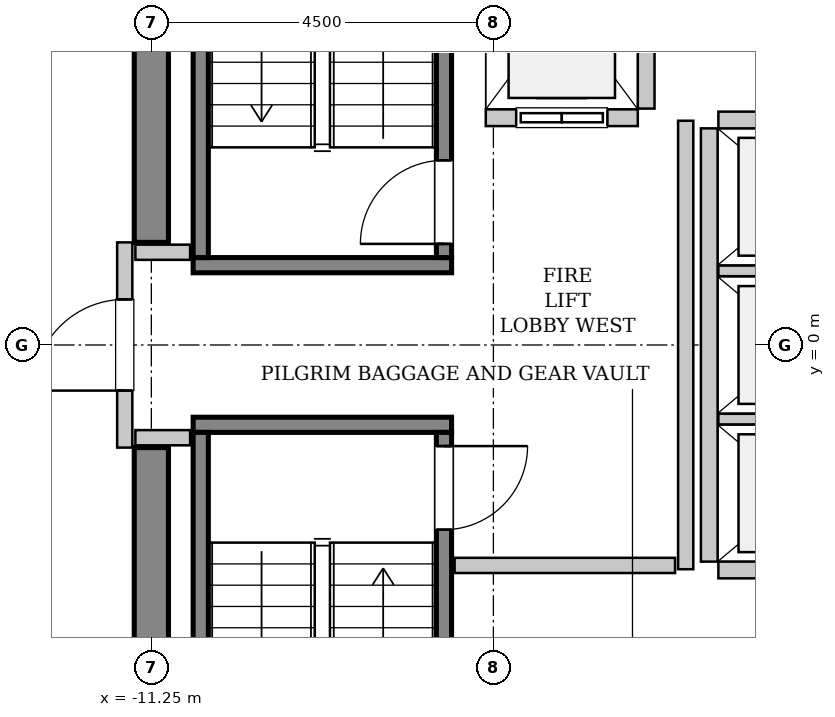
"""IFC4 building model, lengths in metres.
Left out: names, types, materials, properties, quantities, classifications, styles, units other than length and angle.
Written with IfcOpenShell. Run it as: python <this file> out.ifc"""

import sys

from ifc_helpers import new_model, si_unit, direction, frame, frame_2d, origin, place, context, subcontext, project, spatial, rectangle, extrude, source, transform, mapped, element, fill, save


model = new_model("IFC4")
c1 = context("Model", 3, precision=1e-05, world=origin(), true_north=direction((0.0, 1.0)))
c2 = subcontext(c1, "Body", "Model", "MODEL_VIEW")
j1 = project(units=[si_unit("LENGTHUNIT", "METRE"), si_unit("PLANEANGLEUNIT", "RADIAN")], contexts=[c1])
p1 = place(None, origin())
s1 = spatial("IfcSite", under=j1, at=p1, CompositionType="ELEMENT")
p2 = place(p1, origin())
s2 = spatial("IfcBuilding", under=s1, at=p2, CompositionType="ELEMENT")
p3 = place(p2, frame((0.0, 0.0, 291.2)))
s3 = spatial("IfcBuildingStorey", under=s2, at=p3, CompositionType="ELEMENT", Elevation=291.2)
m1 = source(origin(), c2, "Body", "SweptSolid", [
    extrude(rectangle(XDim=7.425, YDim=0.45, at=frame_2d((3.712, 0.0))), origin(), (0.0, 0.0, 1.0), 3.8),
])
for number, where, z_axis, x_axis in (
    (1, (-11.25, -8.775, 0.0), (0.0, 0.0, 1.0), (0.0, 1.0, 0.0)),
    (2, (-11.25, 1.35, 0.0), (0.0, 0.0, 1.0), (0.0, 1.0, 0.0)),
):
    element("IfcWall", number, at=place(p3, frame(where, z_axis=z_axis, x_axis=x_axis)), inside=s3, PredefinedType="SHEAR", context=c2, shape_type="MappedRepresentation", body=[
        mapped(m1, transform((0.0, 0.0, 0.0), x_axis=(1.0, 0.0, 0.0), y_axis=(0.0, 1.0, 0.0), z_axis=(0.0, 0.0, 1.0), scale=1.0)),
    ])
m2 = source(origin(), c2, "Body", "SweptSolid", [
    extrude(rectangle(XDim=3.4, YDim=0.2, at=frame_2d((1.7, 0.0))), origin(), (0.0, 0.0, 1.0), 3.8),
])
p4 = place(p3, frame((-7.3, 1.05, 0.0), z_axis=(0.0, 0.0, 1.0), x_axis=(-1.0, 0.0, 0.0)))
e3 = element("IfcWall", 3, at=p4, inside=s3, PredefinedType="SOLIDWALL", context=c2, shape_type="MappedRepresentation", body=[
    mapped(m2, transform((0.0, 0.0, 0.0), x_axis=(1.0, 0.0, 0.0), y_axis=(0.0, 1.0, 0.0), z_axis=(0.0, 0.0, 1.0), scale=1.0)),
])
m3 = source(origin(), c2, "Body", "SweptSolid", [
    extrude(rectangle(XDim=7.1, YDim=0.2, at=frame_2d((3.55, 0.0))), origin(), (0.0, 0.0, 1.0), 3.8),
])
p5 = place(p3, frame((-7.4, 1.15, 0.0), z_axis=(0.0, 0.0, 1.0), x_axis=(0.0, 1.0, 0.0)))
e4 = element("IfcWall", 4, at=p5, inside=s3, PredefinedType="SOLIDWALL", context=c2, shape_type="MappedRepresentation", body=[
    mapped(m3, transform((0.0, 0.0, 0.0), x_axis=(1.0, 0.0, 0.0), y_axis=(0.0, 1.0, 0.0), z_axis=(0.0, 0.0, 1.0), scale=1.0)),
])
p6 = place(p5, frame((0.18, 0.0, 0.0)))
e5 = element("IfcOpeningElement", 5, at=p6, cuts=e4, PredefinedType="OPENING", context=c2, shape_type="SweptSolid", body=[
    extrude(rectangle(XDim=1.1, YDim=2.15, at=frame_2d((0.55, 1.075))), frame((0.0, 0.11, 0.0), z_axis=(0.0, -1.0, 0.0), x_axis=(1.0, 0.0, 0.0)), (0.0, 0.0, 1.0), 0.22),
])
p7 = place(p3, frame((-10.6, 1.15, 0.0), z_axis=(0.0, 0.0, 1.0), x_axis=(0.0, 1.0, 0.0)))
e6 = element("IfcWall", 6, at=p7, inside=s3, PredefinedType="SOLIDWALL", context=c2, shape_type="MappedRepresentation", body=[
    mapped(m3, transform((0.0, 0.0, 0.0), x_axis=(1.0, 0.0, 0.0), y_axis=(0.0, 1.0, 0.0), z_axis=(0.0, 0.0, 1.0), scale=1.0)),
])
p8 = place(p3, frame((-10.7, -1.05, 0.0), z_axis=(0.0, 0.0, 1.0), x_axis=(1.0, 0.0, 0.0)))
e7 = element("IfcWall", 7, at=p8, inside=s3, PredefinedType="SOLIDWALL", context=c2, shape_type="MappedRepresentation", body=[
    mapped(m2, transform((0.0, 0.0, 0.0), x_axis=(1.0, 0.0, 0.0), y_axis=(0.0, 1.0, 0.0), z_axis=(0.0, 0.0, 1.0), scale=1.0)),
])
p9 = place(p3, frame((-10.6, -1.15, 0.0), z_axis=(0.0, 0.0, 1.0), x_axis=(0.0, -1.0, 0.0)))
e8 = element("IfcWall", 8, at=p9, inside=s3, PredefinedType="SOLIDWALL", context=c2, shape_type="MappedRepresentation", body=[
    mapped(m3, transform((0.0, 0.0, 0.0), x_axis=(1.0, 0.0, 0.0), y_axis=(0.0, 1.0, 0.0), z_axis=(0.0, 0.0, 1.0), scale=1.0)),
])
p10 = place(p3, frame((-7.4, -1.15, 0.0), z_axis=(0.0, 0.0, 1.0), x_axis=(0.0, -1.0, 0.0)))
e9 = element("IfcWall", 9, at=p10, inside=s3, PredefinedType="SOLIDWALL", context=c2, shape_type="MappedRepresentation", body=[
    mapped(m3, transform((0.0, 0.0, 0.0), x_axis=(1.0, 0.0, 0.0), y_axis=(0.0, 1.0, 0.0), z_axis=(0.0, 0.0, 1.0), scale=1.0)),
])
p11 = place(p10, frame((0.18, 0.0, 0.0)))
e10 = element("IfcOpeningElement", 10, at=p11, cuts=e9, PredefinedType="OPENING", context=c2, shape_type="SweptSolid", body=[
    extrude(rectangle(XDim=1.1, YDim=2.15, at=frame_2d((0.55, 1.075))), frame((0.0, 0.11, 0.0), z_axis=(0.0, -1.0, 0.0), x_axis=(1.0, 0.0, 0.0)), (0.0, 0.0, 1.0), 0.22),
])
m4 = source(origin(), c2, "Body", "SweptSolid", [
    extrude(rectangle(XDim=2.0, YDim=0.22, at=frame_2d((1.0, 0.0))), origin(), (0.0, 0.0, 1.0), 3.535),
])
p12 = place(p3, frame((-6.85, 2.99, 0.0), z_axis=(0.0, 0.0, 1.0), x_axis=(1.0, 0.0, 0.0)))
e11 = element("IfcWall", 11, at=p12, inside=s3, PredefinedType="SOLIDWALL", context=c2, shape_type="MappedRepresentation", body=[
    mapped(m4, transform((0.0, 0.0, 0.0), x_axis=(1.0, 0.0, 0.0), y_axis=(0.0, 1.0, 0.0), z_axis=(0.0, 0.0, 1.0), scale=1.0)),
])
p13 = place(p12, frame((0.4, 0.0, 0.0)))
e12 = element("IfcOpeningElement", 12, at=p13, cuts=e11, PredefinedType="OPENING", context=c2, shape_type="SweptSolid", body=[
    extrude(rectangle(XDim=1.2, YDim=2.2, at=frame_2d((0.6, 1.1))), frame((0.0, 0.12, 0.0), z_axis=(0.0, -1.0, 0.0), x_axis=(1.0, 0.0, 0.0)), (0.0, 0.0, 1.0), 0.24),
])
m5 = source(origin(), c2, "Body", "SweptSolid", [
    extrude(rectangle(XDim=2.68, YDim=0.22, at=frame_2d((1.34, 0.0))), origin(), (0.0, 0.0, 1.0), 3.535),
])
p14 = place(p3, frame((-4.74, 3.11, 0.0), z_axis=(0.0, 0.0, 1.0), x_axis=(0.0, 1.0, 0.0)))
e13 = element("IfcWall", 13, at=p14, inside=s3, PredefinedType="SOLIDWALL", context=c2, shape_type="MappedRepresentation", body=[
    mapped(m5, transform((0.0, 0.0, 0.0), x_axis=(1.0, 0.0, 0.0), y_axis=(0.0, 1.0, 0.0), z_axis=(0.0, 0.0, 1.0), scale=1.0)),
])
m6 = source(origin(), c2, "Body", "SweptSolid", [
    extrude(rectangle(XDim=5.7, YDim=0.22, at=frame_2d((2.85, 0.0))), origin(), (0.0, 0.0, 1.0), 3.535),
])
p15 = place(p3, frame((-3.91, 2.85, 0.0), z_axis=(0.0, 0.0, 1.0), x_axis=(0.0, -1.0, 0.0)))
e14 = element("IfcWall", 14, at=p15, inside=s3, PredefinedType="SOLIDWALL", context=c2, shape_type="MappedRepresentation", body=[
    mapped(m6, transform((0.0, 0.0, 0.0), x_axis=(1.0, 0.0, 0.0), y_axis=(0.0, 1.0, 0.0), z_axis=(0.0, 0.0, 1.0), scale=1.0)),
])
m7 = source(origin(), c2, "Body", "SweptSolid", [
    extrude(rectangle(XDim=2.13, YDim=0.22, at=frame_2d((1.065, 0.0))), origin(), (0.0, 0.0, 1.0), 3.535),
])
p16 = place(p3, frame((-3.79, -2.96, 0.0), z_axis=(0.0, 0.0, 1.0), x_axis=(1.0, 0.0, 0.0)))
e15 = element("IfcWall", 15, at=p16, inside=s3, PredefinedType="SOLIDWALL", context=c2, shape_type="MappedRepresentation", body=[
    mapped(m7, transform((0.0, 0.0, 0.0), x_axis=(1.0, 0.0, 0.0), y_axis=(0.0, 1.0, 0.0), z_axis=(0.0, 0.0, 1.0), scale=1.0)),
])
m8 = source(origin(), c2, "Body", "SweptSolid", [
    extrude(rectangle(XDim=2.13, YDim=0.14, at=frame_2d((1.065, 0.0))), origin(), (0.0, 0.0, 1.0), 3.535),
])
for number, where, z_axis, x_axis in (
    (16, (-3.79, -0.975, 0.0), (0.0, 0.0, 1.0), (1.0, 0.0, 0.0)),
    (17, (-3.79, 0.975, 0.0), (0.0, 0.0, 1.0), (1.0, 0.0, 0.0)),
):
    element("IfcWall", number, at=place(p3, frame(where, z_axis=z_axis, x_axis=x_axis)), inside=s3, PredefinedType="PARTITIONING", context=c2, shape_type="MappedRepresentation", body=[
        mapped(m8, transform((0.0, 0.0, 0.0), x_axis=(1.0, 0.0, 0.0), y_axis=(0.0, 1.0, 0.0), z_axis=(0.0, 0.0, 1.0), scale=1.0)),
    ])
p17 = place(p3, frame((-1.66, 2.96, 0.0), z_axis=(0.0, 0.0, 1.0), x_axis=(-1.0, 0.0, 0.0)))
e18 = element("IfcWall", 18, at=p17, inside=s3, PredefinedType="SOLIDWALL", context=c2, shape_type="MappedRepresentation", body=[
    mapped(m7, transform((0.0, 0.0, 0.0), x_axis=(1.0, 0.0, 0.0), y_axis=(0.0, 1.0, 0.0), z_axis=(0.0, 0.0, 1.0), scale=1.0)),
])
m9 = source(origin(), c2, "Body", "SweptSolid", [
    extrude(rectangle(XDim=2.7, YDim=0.2, at=frame_2d((1.35, 0.0))), origin(), (0.0, 0.0, 1.0), 2.625),
])
p18 = place(p3, frame((-11.6, -1.35, 0.0), z_axis=(0.0, 0.0, 1.0), x_axis=(0.0, 1.0, 0.0)))
e19 = element("IfcWall", 19, at=p18, inside=s3, PredefinedType="PARTITIONING", context=c2, shape_type="MappedRepresentation", body=[
    mapped(m9, transform((0.0, 0.0, 0.0), x_axis=(1.0, 0.0, 0.0), y_axis=(0.0, 1.0, 0.0), z_axis=(0.0, 0.0, 1.0), scale=1.0)),
])
p19 = place(p18, frame((0.75, 0.0, 0.0)))
e20 = element("IfcOpeningElement", 20, at=p19, cuts=e19, PredefinedType="OPENING", context=c2, shape_type="SweptSolid", body=[
    extrude(rectangle(XDim=1.2, YDim=2.15, at=frame_2d((0.6, 1.075))), frame((0.0, 0.11, 0.0), z_axis=(0.0, -1.0, 0.0), x_axis=(1.0, 0.0, 0.0)), (0.0, 0.0, 1.0), 0.22),
])
m10 = source(origin(), c2, "Body", "SweptSolid", [
    extrude(rectangle(XDim=5.9, YDim=0.2, at=frame_2d((2.95, 0.0))), origin(), (0.0, 0.0, 1.0), 3.535),
])
p20 = place(p3, frame((-4.22, -2.95, 0.0), z_axis=(0.0, 0.0, 1.0), x_axis=(0.0, 1.0, 0.0)))
e21 = element("IfcWall", 21, at=p20, inside=s3, PredefinedType="PARTITIONING", context=c2, shape_type="MappedRepresentation", body=[
    mapped(m10, transform((0.0, 0.0, 0.0), x_axis=(1.0, 0.0, 0.0), y_axis=(0.0, 1.0, 0.0), z_axis=(0.0, 0.0, 1.0), scale=1.0)),
])
m11 = source(origin(), c2, "Body", "SweptSolid", [
    extrude(rectangle(XDim=2.9, YDim=0.2, at=frame_2d((1.45, 0.0))), origin(), (0.0, 0.0, 1.0), 3.535),
])
p21 = place(p3, frame((-7.26, -2.9, 0.0), z_axis=(0.0, 0.0, 1.0), x_axis=(1.0, 0.0, 0.0)))
e22 = element("IfcWall", 22, at=p21, inside=s3, PredefinedType="PARTITIONING", context=c2, shape_type="MappedRepresentation", body=[
    mapped(m11, transform((0.0, 0.0, 0.0), x_axis=(1.0, 0.0, 0.0), y_axis=(0.0, 1.0, 0.0), z_axis=(0.0, 0.0, 1.0), scale=1.0)),
])
m12 = source(origin(), c2, "Body", "SweptSolid", [
    extrude(rectangle(XDim=0.72, YDim=0.2, at=frame_2d((0.36, 0.0))), origin(), (0.0, 0.0, 1.0), 3.535),
])
for number, where, z_axis, x_axis in (
    (23, (-11.46, 1.22, 0.0), (0.0, 0.0, 1.0), (1.0, 0.0, 0.0)),
    (24, (-11.46, -1.22, 0.0), (0.0, 0.0, 1.0), (1.0, 0.0, 0.0)),
):
    element("IfcWall", number, at=place(p3, frame(where, z_axis=z_axis, x_axis=x_axis)), inside=s3, PredefinedType="PARTITIONING", context=c2, shape_type="MappedRepresentation", body=[
        mapped(m12, transform((0.0, 0.0, 0.0), x_axis=(1.0, 0.0, 0.0), y_axis=(0.0, 1.0, 0.0), z_axis=(0.0, 0.0, 1.0), scale=1.0)),
    ])
m13 = source(origin(), c2, "Body", "SweptSolid", [
    extrude(rectangle(XDim=1.1, YDim=2.15, at=frame_2d((0.55, 1.075))), frame((0.0, 0.025, 0.0), z_axis=(0.0, -1.0, 0.0), x_axis=(1.0, 0.0, 0.0)), (0.0, 0.0, 1.0), 0.05),
])
p22 = place(p6, origin())
e25 = element("IfcDoor", 25, at=p22, inside=s3, OperationType="SINGLE_SWING_LEFT", PredefinedType="DOOR", context=c2, shape_type="MappedRepresentation", body=[
    mapped(m13, transform((0.0, 0.0, 0.0), x_axis=(1.0, 0.0, 0.0), y_axis=(0.0, 1.0, 0.0), z_axis=(0.0, 0.0, 1.0), scale=1.0)),
])
fill(e5, e25)
p23 = place(p11, origin())
e26 = element("IfcDoor", 26, at=p23, inside=s3, OperationType="SINGLE_SWING_LEFT", PredefinedType="DOOR", context=c2, shape_type="MappedRepresentation", body=[
    mapped(m13, transform((0.0, 0.0, 0.0), x_axis=(1.0, 0.0, 0.0), y_axis=(0.0, 1.0, 0.0), z_axis=(0.0, 0.0, 1.0), scale=1.0)),
])
fill(e10, e26)
m14 = source(origin(), c2, "Body", "SweptSolid", [
    extrude(rectangle(XDim=1.2, YDim=2.2, at=frame_2d((0.6, 1.1))), frame((0.0, 0.025, 0.0), z_axis=(0.0, -1.0, 0.0), x_axis=(1.0, 0.0, 0.0)), (0.0, 0.0, 1.0), 0.05),
])
p24 = place(p13, origin())
e27 = element("IfcDoor", 27, at=p24, inside=s3, OperationType="SLIDING_TO_LEFT", PredefinedType="DOOR", context=c2, shape_type="MappedRepresentation", body=[
    mapped(m14, transform((0.0, 0.0, 0.0), x_axis=(1.0, 0.0, 0.0), y_axis=(0.0, 1.0, 0.0), z_axis=(0.0, 0.0, 1.0), scale=1.0)),
])
fill(e12, e27)
m15 = source(origin(), c2, "Body", "SweptSolid", [
    extrude(rectangle(XDim=1.2, YDim=2.15, at=frame_2d((0.6, 1.075))), frame((0.0, 0.025, 0.0), z_axis=(0.0, -1.0, 0.0), x_axis=(1.0, 0.0, 0.0)), (0.0, 0.0, 1.0), 0.05),
])
p25 = place(p19, origin())
e28 = element("IfcDoor", 28, at=p25, inside=s3, OperationType="SINGLE_SWING_LEFT", PredefinedType="DOOR", context=c2, shape_type="MappedRepresentation", body=[
    mapped(m15, transform((0.0, 0.0, 0.0), x_axis=(1.0, 0.0, 0.0), y_axis=(0.0, 1.0, 0.0), z_axis=(0.0, 0.0, 1.0), scale=1.0)),
])
fill(e20, e28)
save(model, sys.argv[1])
